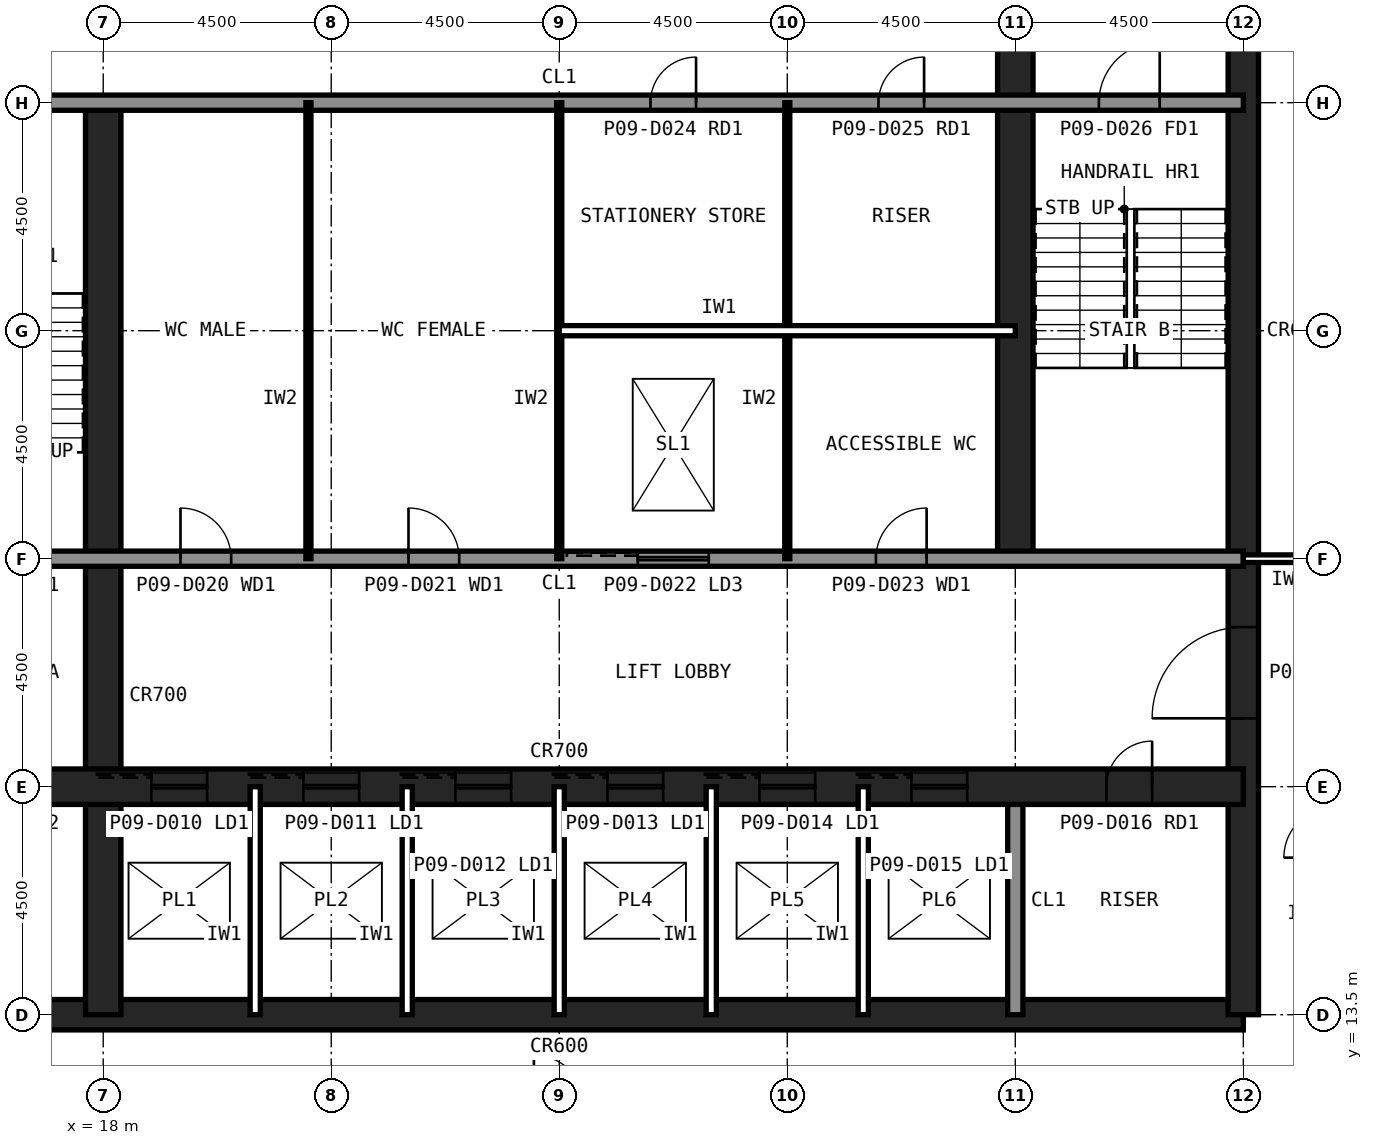
"""IFC4 building model, lengths in metres.
Left out: names, types, materials, properties, quantities, classifications, styles, units other than length and angle.
Written with IfcOpenShell. Run it as: python <this file> out.ifc"""

import sys

from ifc_helpers import new_model, si_unit, direction, frame, frame_2d, origin, place, context, subcontext, project, spatial, rectangle, extrude, element, fill, save


model = new_model("IFC4")
c1 = context("Model", 3, precision=1e-05, world=origin(), true_north=direction((0.0, 1.0)))
c2 = subcontext(c1, "Body", "Model", "MODEL_VIEW")
j1 = project(units=[si_unit("LENGTHUNIT", "METRE"), si_unit("PLANEANGLEUNIT", "RADIAN")], contexts=[c1])
p1 = place(None, origin())
s1 = spatial("IfcSite", under=j1, at=p1, CompositionType="ELEMENT")
p2 = place(p1, origin())
s2 = spatial("IfcBuilding", under=s1, at=p2, CompositionType="ELEMENT")
p3 = place(p2, frame((0.0, 0.0, 41.6)))
s3 = spatial("IfcBuildingStorey", under=s2, at=p3, CompositionType="ELEMENT", Elevation=41.6)
p4 = place(p3, frame((13.5, 13.5, 0.0), z_axis=(0.0, 0.0, 1.0), x_axis=(1.0, 0.0, 0.0)))
e1 = element("IfcWall", 1, at=p4, inside=s3, PredefinedType="SHEAR", context=c2, shape_type="SweptSolid", body=[
    extrude(rectangle(XDim=27.0, YDim=0.6, at=frame_2d((13.5, 0.0))), origin(), (0.0, 0.0, 1.0), 4.2),
])
p5 = place(p3, frame((40.5, 13.5, 0.0), z_axis=(0.0, 0.0, 1.0), x_axis=(0.0, 1.0, 0.0)))
e2 = element("IfcWall", 2, at=p5, inside=s3, PredefinedType="SHEAR", context=c2, shape_type="SweptSolid", body=[
    extrude(rectangle(XDim=27.0, YDim=0.6, at=frame_2d((13.5, 0.0))), origin(), (0.0, 0.0, 1.0), 4.2),
])
p6 = place(p5, frame((5.85, 0.0, 0.0)))
e3 = element("IfcOpeningElement", 3, at=p6, cuts=e2, PredefinedType="OPENING", context=c2, shape_type="SweptSolid", body=[
    extrude(rectangle(XDim=1.8, YDim=2.1, at=frame_2d((0.9, 1.05))), frame((0.0, 0.31, 0.0), z_axis=(0.0, -1.0, 0.0), x_axis=(1.0, 0.0, 0.0)), (0.0, 0.0, 1.0), 0.62),
])
p7 = place(p5, frame((19.65, 0.0, 0.0)))
e4 = element("IfcOpeningElement", 4, at=p7, cuts=e2, PredefinedType="OPENING", context=c2, shape_type="SweptSolid", body=[
    extrude(rectangle(XDim=1.2, YDim=2.1, at=frame_2d((0.6, 1.05))), frame((0.0, 0.31, 0.0), z_axis=(0.0, -1.0, 0.0), x_axis=(1.0, 0.0, 0.0)), (0.0, 0.0, 1.0), 0.62),
])
p8 = place(p3, frame((18.0, 13.5, 0.0), z_axis=(0.0, 0.0, 1.0), x_axis=(0.0, 1.0, 0.0)))
e5 = element("IfcWall", 5, at=p8, inside=s3, PredefinedType="SHEAR", context=c2, shape_type="SweptSolid", body=[
    extrude(rectangle(XDim=18.0, YDim=0.7, at=frame_2d((9.0, 0.0))), origin(), (0.0, 0.0, 1.0), 4.2),
])
p9 = place(p3, frame((36.0, 13.5, 0.0), z_axis=(0.0, 0.0, 1.0), x_axis=(0.0, 1.0, 0.0)))
e6 = element("IfcWall", 6, at=p9, inside=s3, PredefinedType="SOLIDWALL", context=c2, shape_type="SweptSolid", body=[
    extrude(rectangle(XDim=4.5, YDim=0.3, at=frame_2d((2.25, 0.0))), origin(), (0.0, 0.0, 1.0), 4.04),
])
p10 = place(p3, frame((36.0, 22.5, 0.0), z_axis=(0.0, 0.0, 1.0), x_axis=(0.0, 1.0, 0.0)))
e7 = element("IfcWall", 7, at=p10, inside=s3, PredefinedType="SHEAR", context=c2, shape_type="SweptSolid", body=[
    extrude(rectangle(XDim=18.0, YDim=0.7, at=frame_2d((9.0, 0.0))), origin(), (0.0, 0.0, 1.0), 4.2),
])
p11 = place(p3, frame((13.5, 18.0, 0.0), z_axis=(0.0, 0.0, 1.0), x_axis=(1.0, 0.0, 0.0)))
e8 = element("IfcWall", 8, at=p11, inside=s3, PredefinedType="SHEAR", context=c2, shape_type="SweptSolid", body=[
    extrude(rectangle(XDim=27.0, YDim=0.7, at=frame_2d((13.5, 0.0))), origin(), (0.0, 0.0, 1.0), 4.2),
])
p12 = place(p11, frame((24.3, 0.0, 0.0)))
e9 = element("IfcOpeningElement", 9, at=p12, cuts=e8, PredefinedType="OPENING", context=c2, shape_type="SweptSolid", body=[
    extrude(rectangle(XDim=0.9, YDim=2.1, at=frame_2d((0.45, 1.05))), frame((0.0, 0.36, 0.0), z_axis=(0.0, -1.0, 0.0), x_axis=(1.0, 0.0, 0.0)), (0.0, 0.0, 1.0), 0.72),
])
p13 = place(p11, frame((5.45, 0.0, 0.0)))
e10 = element("IfcOpeningElement", 10, at=p13, cuts=e8, PredefinedType="OPENING", context=c2, shape_type="SweptSolid", body=[
    extrude(rectangle(XDim=1.1, YDim=2.1, at=frame_2d((0.55, 1.05))), frame((0.0, 0.36, 0.0), z_axis=(0.0, -1.0, 0.0), x_axis=(1.0, 0.0, 0.0)), (0.0, 0.0, 1.0), 0.72),
])
p14 = place(p11, frame((8.45, 0.0, 0.0)))
e11 = element("IfcOpeningElement", 11, at=p14, cuts=e8, PredefinedType="OPENING", context=c2, shape_type="SweptSolid", body=[
    extrude(rectangle(XDim=1.1, YDim=2.1, at=frame_2d((0.55, 1.05))), frame((0.0, 0.36, 0.0), z_axis=(0.0, -1.0, 0.0), x_axis=(1.0, 0.0, 0.0)), (0.0, 0.0, 1.0), 0.72),
])
p15 = place(p11, frame((11.45, 0.0, 0.0)))
e12 = element("IfcOpeningElement", 12, at=p15, cuts=e8, PredefinedType="OPENING", context=c2, shape_type="SweptSolid", body=[
    extrude(rectangle(XDim=1.1, YDim=2.1, at=frame_2d((0.55, 1.05))), frame((0.0, 0.36, 0.0), z_axis=(0.0, -1.0, 0.0), x_axis=(1.0, 0.0, 0.0)), (0.0, 0.0, 1.0), 0.72),
])
p16 = place(p11, frame((14.45, 0.0, 0.0)))
e13 = element("IfcOpeningElement", 13, at=p16, cuts=e8, PredefinedType="OPENING", context=c2, shape_type="SweptSolid", body=[
    extrude(rectangle(XDim=1.1, YDim=2.1, at=frame_2d((0.55, 1.05))), frame((0.0, 0.36, 0.0), z_axis=(0.0, -1.0, 0.0), x_axis=(1.0, 0.0, 0.0)), (0.0, 0.0, 1.0), 0.72),
])
p17 = place(p11, frame((17.45, 0.0, 0.0)))
e14 = element("IfcOpeningElement", 14, at=p17, cuts=e8, PredefinedType="OPENING", context=c2, shape_type="SweptSolid", body=[
    extrude(rectangle(XDim=1.1, YDim=2.1, at=frame_2d((0.55, 1.05))), frame((0.0, 0.36, 0.0), z_axis=(0.0, -1.0, 0.0), x_axis=(1.0, 0.0, 0.0)), (0.0, 0.0, 1.0), 0.72),
])
p18 = place(p11, frame((20.45, 0.0, 0.0)))
e15 = element("IfcOpeningElement", 15, at=p18, cuts=e8, PredefinedType="OPENING", context=c2, shape_type="SweptSolid", body=[
    extrude(rectangle(XDim=1.1, YDim=2.1, at=frame_2d((0.55, 1.05))), frame((0.0, 0.36, 0.0), z_axis=(0.0, -1.0, 0.0), x_axis=(1.0, 0.0, 0.0)), (0.0, 0.0, 1.0), 0.72),
])
p19 = place(p11, frame((1.6, 0.0, 0.0)))
e16 = element("IfcOpeningElement", 16, at=p19, cuts=e8, PredefinedType="OPENING", context=c2, shape_type="SweptSolid", body=[
    extrude(rectangle(XDim=1.3, YDim=2.2, at=frame_2d((0.65, 1.1))), frame((0.0, 0.36, 0.0), z_axis=(0.0, -1.0, 0.0), x_axis=(1.0, 0.0, 0.0)), (0.0, 0.0, 1.0), 0.72),
])
p20 = place(p3, frame((13.5, 22.5, 0.0), z_axis=(0.0, 0.0, 1.0), x_axis=(1.0, 0.0, 0.0)))
e17 = element("IfcWall", 17, at=p20, inside=s3, PredefinedType="SOLIDWALL", context=c2, shape_type="SweptSolid", body=[
    extrude(rectangle(XDim=27.0, YDim=0.3, at=frame_2d((13.5, 0.0))), origin(), (0.0, 0.0, 1.0), 4.04),
])
p21 = place(p20, frame((1.65, 0.0, 0.0)))
e18 = element("IfcOpeningElement", 18, at=p21, cuts=e17, PredefinedType="OPENING", context=c2, shape_type="SweptSolid", body=[
    extrude(rectangle(XDim=1.2, YDim=2.1, at=frame_2d((0.6, 1.05))), frame((0.0, 0.16, 0.0), z_axis=(0.0, -1.0, 0.0), x_axis=(1.0, 0.0, 0.0)), (0.0, 0.0, 1.0), 0.32),
])
p22 = place(p20, frame((6.025, 0.0, 0.0)))
e19 = element("IfcOpeningElement", 19, at=p22, cuts=e17, PredefinedType="OPENING", context=c2, shape_type="SweptSolid", body=[
    extrude(rectangle(XDim=1.0, YDim=2.1, at=frame_2d((0.5, 1.05))), frame((0.0, 0.16, 0.0), z_axis=(0.0, -1.0, 0.0), x_axis=(1.0, 0.0, 0.0)), (0.0, 0.0, 1.0), 0.32),
])
p23 = place(p20, frame((10.525, 0.0, 0.0)))
e20 = element("IfcOpeningElement", 20, at=p23, cuts=e17, PredefinedType="OPENING", context=c2, shape_type="SweptSolid", body=[
    extrude(rectangle(XDim=1.0, YDim=2.1, at=frame_2d((0.5, 1.05))), frame((0.0, 0.16, 0.0), z_axis=(0.0, -1.0, 0.0), x_axis=(1.0, 0.0, 0.0)), (0.0, 0.0, 1.0), 0.32),
])
p24 = place(p20, frame((19.75, 0.0, 0.0)))
e21 = element("IfcOpeningElement", 21, at=p24, cuts=e17, PredefinedType="OPENING", context=c2, shape_type="SweptSolid", body=[
    extrude(rectangle(XDim=1.0, YDim=2.1, at=frame_2d((0.5, 1.05))), frame((0.0, 0.16, 0.0), z_axis=(0.0, -1.0, 0.0), x_axis=(1.0, 0.0, 0.0)), (0.0, 0.0, 1.0), 0.32),
])
p25 = place(p20, frame((15.05, 0.0, 0.0)))
e22 = element("IfcOpeningElement", 22, at=p25, cuts=e17, PredefinedType="OPENING", context=c2, shape_type="SweptSolid", body=[
    extrude(rectangle(XDim=1.4, YDim=2.4, at=frame_2d((0.7, 1.2))), frame((0.0, 0.16, 0.0), z_axis=(0.0, -1.0, 0.0), x_axis=(1.0, 0.0, 0.0)), (0.0, 0.0, 1.0), 0.32),
])
p26 = place(p3, frame((13.5, 31.5, 0.0), z_axis=(0.0, 0.0, 1.0), x_axis=(1.0, 0.0, 0.0)))
e23 = element("IfcWall", 23, at=p26, inside=s3, PredefinedType="SOLIDWALL", context=c2, shape_type="SweptSolid", body=[
    extrude(rectangle(XDim=27.0, YDim=0.3, at=frame_2d((13.5, 0.0))), origin(), (0.0, 0.0, 1.0), 4.04),
])
p27 = place(p26, frame((24.15, 0.0, 0.0)))
e24 = element("IfcOpeningElement", 24, at=p27, cuts=e23, PredefinedType="OPENING", context=c2, shape_type="SweptSolid", body=[
    extrude(rectangle(XDim=1.2, YDim=2.1, at=frame_2d((0.6, 1.05))), frame((0.0, 0.16, 0.0), z_axis=(0.0, -1.0, 0.0), x_axis=(1.0, 0.0, 0.0)), (0.0, 0.0, 1.0), 0.32),
])
p28 = place(p26, frame((15.3, 0.0, 0.0)))
e25 = element("IfcOpeningElement", 25, at=p28, cuts=e23, PredefinedType="OPENING", context=c2, shape_type="SweptSolid", body=[
    extrude(rectangle(XDim=0.9, YDim=2.1, at=frame_2d((0.45, 1.05))), frame((0.0, 0.16, 0.0), z_axis=(0.0, -1.0, 0.0), x_axis=(1.0, 0.0, 0.0)), (0.0, 0.0, 1.0), 0.32),
])
p29 = place(p26, frame((19.8, 0.0, 0.0)))
e26 = element("IfcOpeningElement", 26, at=p29, cuts=e23, PredefinedType="OPENING", context=c2, shape_type="SweptSolid", body=[
    extrude(rectangle(XDim=0.9, YDim=2.1, at=frame_2d((0.45, 1.05))), frame((0.0, 0.16, 0.0), z_axis=(0.0, -1.0, 0.0), x_axis=(1.0, 0.0, 0.0)), (0.0, 0.0, 1.0), 0.32),
])
for number, where, z_axis, x_axis in (
    (27, (21.0, 13.5, 0.0), (0.0, 0.0, 1.0), (0.0, 1.0, 0.0)),
    (28, (24.0, 13.5, 0.0), (0.0, 0.0, 1.0), (0.0, 1.0, 0.0)),
    (29, (27.0, 13.5, 0.0), (0.0, 0.0, 1.0), (0.0, 1.0, 0.0)),
    (30, (30.0, 13.5, 0.0), (0.0, 0.0, 1.0), (0.0, 1.0, 0.0)),
    (31, (33.0, 13.5, 0.0), (0.0, 0.0, 1.0), (0.0, 1.0, 0.0)),
):
    element("IfcWall", number, at=place(p3, frame(where, z_axis=z_axis, x_axis=x_axis)), inside=s3, PredefinedType="PARTITIONING", context=c2, shape_type="SweptSolid", body=[
        extrude(rectangle(XDim=4.5, YDim=0.2, at=frame_2d((2.25, 0.0))), origin(), (0.0, 0.0, 1.0), 4.04),
    ])
for number, where, z_axis, x_axis in (
    (32, (22.05, 22.5, 0.0), (0.0, 0.0, 1.0), (0.0, 1.0, 0.0)),
    (33, (27.0, 22.5, 0.0), (0.0, 0.0, 1.0), (0.0, 1.0, 0.0)),
    (34, (31.5, 22.5, 0.0), (0.0, 0.0, 1.0), (0.0, 1.0, 0.0)),
):
    element("IfcWall", number, at=place(p3, frame(where, z_axis=z_axis, x_axis=x_axis)), inside=s3, PredefinedType="PLUMBINGWALL", context=c2, shape_type="SweptSolid", body=[
        extrude(rectangle(XDim=9.0, YDim=0.1, at=frame_2d((4.5, 0.0))), origin(), (0.0, 0.0, 1.0), 4.04),
    ])
p30 = place(p3, frame((27.0, 27.0, 0.0), z_axis=(0.0, 0.0, 1.0), x_axis=(1.0, 0.0, 0.0)))
e35 = element("IfcWall", 35, at=p30, inside=s3, PredefinedType="PARTITIONING", context=c2, shape_type="SweptSolid", body=[
    extrude(rectangle(XDim=9.0, YDim=0.2, at=frame_2d((4.5, 0.0))), origin(), (0.0, 0.0, 1.0), 4.04),
])
p31 = place(p3, frame((42.3, 22.5, 0.0), z_axis=(0.0, 0.0, 1.0), x_axis=(-1.0, 0.0, 0.0)))
e36 = element("IfcWall", 36, at=p31, inside=s3, PredefinedType="PARTITIONING", context=c2, shape_type="SweptSolid", body=[
    extrude(rectangle(XDim=1.8, YDim=0.15, at=frame_2d((0.9, 0.0))), origin(), (0.0, 0.0, 1.0), 3.189),
])
p32 = place(p6, origin())
e37 = element("IfcDoor", 37, at=p32, inside=s3, OperationType="SINGLE_SWING_LEFT", PredefinedType="DOOR", context=c2, shape_type="SweptSolid", body=[
    extrude(rectangle(XDim=1.8, YDim=2.1, at=frame_2d((0.9, 1.05))), frame((0.0, 0.025, 0.0), z_axis=(0.0, -1.0, 0.0), x_axis=(1.0, 0.0, 0.0)), (0.0, 0.0, 1.0), 0.05),
])
fill(e3, e37)
p33 = place(p27, origin())
e38 = element("IfcDoor", 38, at=p33, inside=s3, OperationType="SINGLE_SWING_RIGHT", PredefinedType="DOOR", context=c2, shape_type="SweptSolid", body=[
    extrude(rectangle(XDim=1.2, YDim=2.1, at=frame_2d((0.6, 1.05))), frame((0.0, 0.025, 0.0), z_axis=(0.0, -1.0, 0.0), x_axis=(1.0, 0.0, 0.0)), (0.0, 0.0, 1.0), 0.05),
])
fill(e24, e38)
p34 = place(p22, origin())
e39 = element("IfcDoor", 39, at=p34, inside=s3, OperationType="SINGLE_SWING_LEFT", PredefinedType="DOOR", context=c2, shape_type="SweptSolid", body=[
    extrude(rectangle(XDim=1.0, YDim=2.1, at=frame_2d((0.5, 1.05))), frame((0.0, 0.025, 0.0), z_axis=(0.0, -1.0, 0.0), x_axis=(1.0, 0.0, 0.0)), (0.0, 0.0, 1.0), 0.05),
])
fill(e19, e39)
p35 = place(p23, origin())
e40 = element("IfcDoor", 40, at=p35, inside=s3, OperationType="SINGLE_SWING_LEFT", PredefinedType="DOOR", context=c2, shape_type="SweptSolid", body=[
    extrude(rectangle(XDim=1.0, YDim=2.1, at=frame_2d((0.5, 1.05))), frame((0.0, 0.025, 0.0), z_axis=(0.0, -1.0, 0.0), x_axis=(1.0, 0.0, 0.0)), (0.0, 0.0, 1.0), 0.05),
])
fill(e20, e40)
p36 = place(p24, origin())
e41 = element("IfcDoor", 41, at=p36, inside=s3, OperationType="SINGLE_SWING_RIGHT", PredefinedType="DOOR", context=c2, shape_type="SweptSolid", body=[
    extrude(rectangle(XDim=1.0, YDim=2.1, at=frame_2d((0.5, 1.05))), frame((0.0, 0.025, 0.0), z_axis=(0.0, -1.0, 0.0), x_axis=(1.0, 0.0, 0.0)), (0.0, 0.0, 1.0), 0.05),
])
fill(e21, e41)
p37 = place(p28, origin())
e42 = element("IfcDoor", 42, at=p37, inside=s3, OperationType="SINGLE_SWING_RIGHT", PredefinedType="DOOR", context=c2, shape_type="SweptSolid", body=[
    extrude(rectangle(XDim=0.9, YDim=2.1, at=frame_2d((0.45, 1.05))), frame((0.0, 0.025, 0.0), z_axis=(0.0, -1.0, 0.0), x_axis=(1.0, 0.0, 0.0)), (0.0, 0.0, 1.0), 0.05),
])
fill(e25, e42)
p38 = place(p29, origin())
e43 = element("IfcDoor", 43, at=p38, inside=s3, OperationType="SINGLE_SWING_RIGHT", PredefinedType="DOOR", context=c2, shape_type="SweptSolid", body=[
    extrude(rectangle(XDim=0.9, YDim=2.1, at=frame_2d((0.45, 1.05))), frame((0.0, 0.025, 0.0), z_axis=(0.0, -1.0, 0.0), x_axis=(1.0, 0.0, 0.0)), (0.0, 0.0, 1.0), 0.05),
])
fill(e26, e43)
p39 = place(p12, origin())
e44 = element("IfcDoor", 44, at=p39, inside=s3, OperationType="SINGLE_SWING_RIGHT", PredefinedType="DOOR", context=c2, shape_type="SweptSolid", body=[
    extrude(rectangle(XDim=0.9, YDim=2.1, at=frame_2d((0.45, 1.05))), frame((0.0, 0.025, 0.0), z_axis=(0.0, -1.0, 0.0), x_axis=(1.0, 0.0, 0.0)), (0.0, 0.0, 1.0), 0.05),
])
fill(e9, e44)
p40 = place(p13, origin())
e45 = element("IfcDoor", 45, at=p40, inside=s3, OperationType="SLIDING_TO_LEFT", PredefinedType="DOOR", context=c2, shape_type="SweptSolid", body=[
    extrude(rectangle(XDim=1.1, YDim=2.1, at=frame_2d((0.55, 1.05))), frame((0.0, 0.025, 0.0), z_axis=(0.0, -1.0, 0.0), x_axis=(1.0, 0.0, 0.0)), (0.0, 0.0, 1.0), 0.05),
])
fill(e10, e45)
p41 = place(p14, origin())
e46 = element("IfcDoor", 46, at=p41, inside=s3, OperationType="SLIDING_TO_LEFT", PredefinedType="DOOR", context=c2, shape_type="SweptSolid", body=[
    extrude(rectangle(XDim=1.1, YDim=2.1, at=frame_2d((0.55, 1.05))), frame((0.0, 0.025, 0.0), z_axis=(0.0, -1.0, 0.0), x_axis=(1.0, 0.0, 0.0)), (0.0, 0.0, 1.0), 0.05),
])
fill(e11, e46)
p42 = place(p15, origin())
e47 = element("IfcDoor", 47, at=p42, inside=s3, OperationType="SLIDING_TO_LEFT", PredefinedType="DOOR", context=c2, shape_type="SweptSolid", body=[
    extrude(rectangle(XDim=1.1, YDim=2.1, at=frame_2d((0.55, 1.05))), frame((0.0, 0.025, 0.0), z_axis=(0.0, -1.0, 0.0), x_axis=(1.0, 0.0, 0.0)), (0.0, 0.0, 1.0), 0.05),
])
fill(e12, e47)
p43 = place(p16, origin())
e48 = element("IfcDoor", 48, at=p43, inside=s3, OperationType="SLIDING_TO_LEFT", PredefinedType="DOOR", context=c2, shape_type="SweptSolid", body=[
    extrude(rectangle(XDim=1.1, YDim=2.1, at=frame_2d((0.55, 1.05))), frame((0.0, 0.025, 0.0), z_axis=(0.0, -1.0, 0.0), x_axis=(1.0, 0.0, 0.0)), (0.0, 0.0, 1.0), 0.05),
])
fill(e13, e48)
p44 = place(p17, origin())
e49 = element("IfcDoor", 49, at=p44, inside=s3, OperationType="SLIDING_TO_LEFT", PredefinedType="DOOR", context=c2, shape_type="SweptSolid", body=[
    extrude(rectangle(XDim=1.1, YDim=2.1, at=frame_2d((0.55, 1.05))), frame((0.0, 0.025, 0.0), z_axis=(0.0, -1.0, 0.0), x_axis=(1.0, 0.0, 0.0)), (0.0, 0.0, 1.0), 0.05),
])
fill(e14, e49)
p45 = place(p18, origin())
e50 = element("IfcDoor", 50, at=p45, inside=s3, OperationType="SLIDING_TO_LEFT", PredefinedType="DOOR", context=c2, shape_type="SweptSolid", body=[
    extrude(rectangle(XDim=1.1, YDim=2.1, at=frame_2d((0.55, 1.05))), frame((0.0, 0.025, 0.0), z_axis=(0.0, -1.0, 0.0), x_axis=(1.0, 0.0, 0.0)), (0.0, 0.0, 1.0), 0.05),
])
fill(e15, e50)
p46 = place(p25, origin())
e51 = element("IfcDoor", 51, at=p46, inside=s3, OperationType="SLIDING_TO_LEFT", PredefinedType="DOOR", context=c2, shape_type="SweptSolid", body=[
    extrude(rectangle(XDim=1.4, YDim=2.4, at=frame_2d((0.7, 1.2))), frame((0.0, 0.025, 0.0), z_axis=(0.0, -1.0, 0.0), x_axis=(1.0, 0.0, 0.0)), (0.0, 0.0, 1.0), 0.05),
])
fill(e22, e51)
save(model, sys.argv[1])
